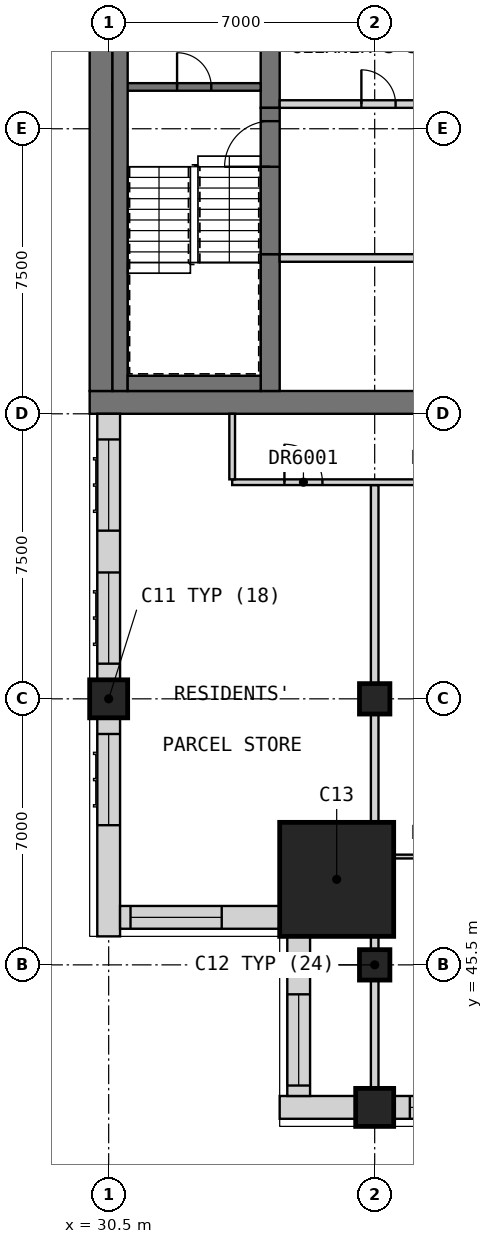
"""IFC4 building model, lengths in metres.
Left out: names, types, materials, properties, quantities, classifications, styles, units other than length and angle.
Written with IfcOpenShell. Run it as: python <this file> out.ifc"""

import sys

from ifc_helpers import new_model, si_unit, direction, frame, frame_2d, origin, origin_2d, place, context, subcontext, project, spatial, rectangle, extrude, element, fill, save


model = new_model("IFC4")
c1 = context("Model", 3, precision=1e-05, world=origin(), true_north=direction((0.0, 1.0)))
c2 = subcontext(c1, "Body", "Model", "MODEL_VIEW")
j1 = project(units=[si_unit("LENGTHUNIT", "METRE"), si_unit("PLANEANGLEUNIT", "RADIAN")], contexts=[c1])
p1 = place(None, origin())
s1 = spatial("IfcSite", under=j1, at=p1, CompositionType="ELEMENT")
p2 = place(p1, origin())
s2 = spatial("IfcBuilding", under=s1, at=p2, CompositionType="ELEMENT")
p3 = place(p2, frame((0.0, 0.0, 254.7)))
s3 = spatial("IfcBuildingStorey", under=s2, at=p3, CompositionType="ELEMENT", Elevation=254.7)
for number, where, z_axis, x_axis in (
    (1, (37.5, 41.75, 0.0), (0.0, 0.0, 1.0), (1.0, 0.0, 0.0)),
    (2, (30.5, 52.5, 0.0), (0.0, 0.0, 1.0), (1.0, 0.0, 0.0)),
):
    element("IfcColumn", number, at=place(p3, frame(where, z_axis=z_axis, x_axis=x_axis)), inside=s3, PredefinedType="COLUMN", context=c2, shape_type="SweptSolid", body=[
        extrude(rectangle(XDim=1.0, YDim=1.0, at=origin_2d()), origin(), (0.0, 0.0, 1.0), 3.5),
    ])
for number, where, z_axis, x_axis in (
    (3, (37.5, 45.5, 0.0), (0.0, 0.0, 1.0), (1.0, 0.0, 0.0)),
    (4, (37.5, 52.5, 0.0), (0.0, 0.0, 1.0), (1.0, 0.0, 0.0)),
):
    element("IfcColumn", number, at=place(p3, frame(where, z_axis=z_axis, x_axis=x_axis)), inside=s3, PredefinedType="COLUMN", context=c2, shape_type="SweptSolid", body=[
        extrude(rectangle(XDim=0.8, YDim=0.8, at=origin_2d()), origin(), (0.0, 0.0, 1.0), 3.5),
    ])
p4 = place(p3, frame((36.5, 47.75, 0.0), z_axis=(0.0, 0.0, 1.0), x_axis=(1.0, 0.0, 0.0)))
e5 = element("IfcColumn", 5, at=p4, inside=s3, PredefinedType="COLUMN", context=c2, shape_type="SweptSolid", body=[
    extrude(rectangle(XDim=3.0, YDim=3.0, at=origin_2d()), origin(), (0.0, 0.0, 1.0), 3.5),
])
p5 = place(p3, frame((30.0, 60.3, 0.0), z_axis=(0.0, 0.0, 1.0), x_axis=(1.0, 0.0, 0.0)))
e6 = element("IfcWall", 6, at=p5, inside=s3, PredefinedType="SHEAR", context=c2, shape_type="SweptSolid", body=[
    extrude(rectangle(XDim=30.0, YDim=0.6, at=frame_2d((15.0, 0.0))), origin(), (0.0, 0.0, 1.0), 3.5),
])
p6 = place(p5, frame((21.9, 0.0, 0.0)))
e7 = element("IfcOpeningElement", 7, at=p6, cuts=e6, PredefinedType="OPENING", context=c2, shape_type="SweptSolid", body=[
    extrude(rectangle(XDim=1.8, YDim=2.1, at=frame_2d((0.9, 1.05))), frame((0.0, 0.31, 0.0), z_axis=(0.0, -1.0, 0.0), x_axis=(1.0, 0.0, 0.0)), (0.0, 0.0, 1.0), 0.62),
])
p7 = place(p5, frame((26.5, 0.0, 0.0)))
e8 = element("IfcOpeningElement", 8, at=p7, cuts=e6, PredefinedType="OPENING", context=c2, shape_type="SweptSolid", body=[
    extrude(rectangle(XDim=1.2, YDim=2.1, at=frame_2d((0.6, 1.05))), frame((0.0, 0.31, 0.0), z_axis=(0.0, -1.0, 0.0), x_axis=(1.0, 0.0, 0.0)), (0.0, 0.0, 1.0), 0.62),
])
p8 = place(p3, frame((30.3, 60.6, 0.0), z_axis=(0.0, 0.0, 1.0), x_axis=(0.0, 1.0, 0.0)))
e9 = element("IfcWall", 9, at=p8, inside=s3, PredefinedType="SHEAR", context=c2, shape_type="SweptSolid", body=[
    extrude(rectangle(XDim=21.3, YDim=0.6, at=frame_2d((10.65, 0.0))), origin(), (0.0, 0.0, 1.0), 3.5),
])
p9 = place(p3, frame((34.75, 60.6, 0.0), z_axis=(0.0, 0.0, 1.0), x_axis=(0.0, 1.0, 0.0)))
e10 = element("IfcWall", 10, at=p9, inside=s3, PredefinedType="SHEAR", context=c2, shape_type="SweptSolid", body=[
    extrude(rectangle(XDim=3.6, YDim=0.5, at=frame_2d((1.8, 0.0))), origin(), (0.0, 0.0, 1.0), 3.5),
])
p10 = place(p3, frame((34.75, 68.05, 0.0), z_axis=(0.0, 0.0, 1.0), x_axis=(0.0, 1.0, 0.0)))
e11 = element("IfcWall", 11, at=p10, inside=s3, PredefinedType="SHEAR", context=c2, shape_type="SweptSolid", body=[
    extrude(rectangle(XDim=6.4, YDim=0.5, at=frame_2d((3.2, 0.0))), origin(), (0.0, 0.0, 1.0), 3.5),
])
p11 = place(p2, frame((0.0, 0.0, 34.0)))
s4 = spatial("IfcBuildingStorey", under=s2, at=p11, CompositionType="ELEMENT", Elevation=34.0)
for number, where, z_axis, x_axis in (
    (12, (29.7, 61.05, 0.0), (0.0, 0.0, 1.0), (0.0, 1.0, 0.0)),
    (13, (29.7, 65.925, 0.0), (0.0, 0.0, 1.0), (0.0, 1.0, 0.0)),
):
    element("IfcWall", number, at=place(p11, frame(where, z_axis=z_axis, x_axis=x_axis)), inside=s4, PredefinedType="SOLIDWALL", context=c2, shape_type="SweptSolid", body=[
        extrude(rectangle(XDim=0.9, YDim=0.6, at=frame_2d((0.45, 0.0))), origin(), (0.0, 0.0, 1.0), 286.2),
    ])
p12 = place(p3, frame((35.0, 41.75, 0.0), z_axis=(0.0, 0.0, 1.0), x_axis=(1.0, 0.0, 0.0)))
e14 = element("IfcWall", 14, at=p12, inside=s3, PredefinedType="SOLIDWALL", context=c2, shape_type="SweptSolid", body=[
    extrude(rectangle(XDim=2.0, YDim=0.6, at=frame_2d((1.0, 0.0))), origin(), (0.0, 0.0, 1.0), 3.1),
])
p13 = place(p3, frame((38.0, 41.75, 0.0), z_axis=(0.0, 0.0, 1.0), x_axis=(1.0, 0.0, 0.0)))
e15 = element("IfcWall", 15, at=p13, inside=s3, PredefinedType="SOLIDWALL", context=c2, shape_type="SweptSolid", body=[
    extrude(rectangle(XDim=6.5, YDim=0.6, at=frame_2d((3.25, 0.0))), origin(), (0.0, 0.0, 1.0), 2.75),
])
p14 = place(p13, frame((0.425, 0.0, 0.8)))
e16 = element("IfcOpeningElement", 16, at=p14, cuts=e15, PredefinedType="OPENING", context=c2, shape_type="SweptSolid", body=[
    extrude(rectangle(XDim=2.4, YDim=1.8, at=frame_2d((1.2, 0.9))), frame((0.0, 0.31, 0.0), z_axis=(0.0, -1.0, 0.0), x_axis=(1.0, 0.0, 0.0)), (0.0, 0.0, 1.0), 0.62),
])
p15 = place(p13, frame((3.675, 0.0, 0.8)))
e17 = element("IfcOpeningElement", 17, at=p15, cuts=e15, PredefinedType="OPENING", context=c2, shape_type="SweptSolid", body=[
    extrude(rectangle(XDim=2.4, YDim=1.8, at=frame_2d((1.2, 0.9))), frame((0.0, 0.31, 0.0), z_axis=(0.0, -1.0, 0.0), x_axis=(1.0, 0.0, 0.0)), (0.0, 0.0, 1.0), 0.62),
])
p16 = place(p3, frame((30.5, 60.0, 0.0), z_axis=(0.0, 0.0, 1.0), x_axis=(0.0, -1.0, 0.0)))
e18 = element("IfcWall", 18, at=p16, inside=s3, PredefinedType="SOLIDWALL", context=c2, shape_type="SweptSolid", body=[
    extrude(rectangle(XDim=7.0, YDim=0.6, at=frame_2d((3.5, 0.0))), origin(), (0.0, 0.0, 1.0), 3.1),
])
p17 = place(p16, frame((4.175, 0.0, 0.8)))
e19 = element("IfcOpeningElement", 19, at=p17, cuts=e18, PredefinedType="OPENING", context=c2, shape_type="SweptSolid", body=[
    extrude(rectangle(XDim=2.4, YDim=1.8, at=frame_2d((1.2, 0.9))), frame((0.0, 0.31, 0.0), z_axis=(0.0, -1.0, 0.0), x_axis=(1.0, 0.0, 0.0)), (0.0, 0.0, 1.0), 0.62),
])
p18 = place(p16, frame((0.675, 0.0, 0.8)))
e20 = element("IfcOpeningElement", 20, at=p18, cuts=e18, PredefinedType="OPENING", context=c2, shape_type="SweptSolid", body=[
    extrude(rectangle(XDim=2.4, YDim=1.8, at=frame_2d((1.2, 0.9))), frame((0.0, 0.31, 0.0), z_axis=(0.0, -1.0, 0.0), x_axis=(1.0, 0.0, 0.0)), (0.0, 0.0, 1.0), 0.62),
])
p19 = place(p3, frame((30.5, 52.0, 0.0), z_axis=(0.0, 0.0, 1.0), x_axis=(0.0, -1.0, 0.0)))
e21 = element("IfcWall", 21, at=p19, inside=s3, PredefinedType="SOLIDWALL", context=c2, shape_type="SweptSolid", body=[
    extrude(rectangle(XDim=5.75, YDim=0.6, at=frame_2d((2.875, 0.0))), origin(), (0.0, 0.0, 1.0), 3.1),
])
p20 = place(p19, frame((0.425, 0.0, 0.8)))
e22 = element("IfcOpeningElement", 22, at=p20, cuts=e21, PredefinedType="OPENING", context=c2, shape_type="SweptSolid", body=[
    extrude(rectangle(XDim=2.4, YDim=1.8, at=frame_2d((1.2, 0.9))), frame((0.0, 0.31, 0.0), z_axis=(0.0, -1.0, 0.0), x_axis=(1.0, 0.0, 0.0)), (0.0, 0.0, 1.0), 0.62),
])
p21 = place(p3, frame((30.8, 46.75, 0.0), z_axis=(0.0, 0.0, 1.0), x_axis=(1.0, 0.0, 0.0)))
e23 = element("IfcWall", 23, at=p21, inside=s3, PredefinedType="SOLIDWALL", context=c2, shape_type="SweptSolid", body=[
    extrude(rectangle(XDim=4.2, YDim=0.6, at=frame_2d((2.1, 0.0))), origin(), (0.0, 0.0, 1.0), 3.1),
])
p22 = place(p21, frame((0.275, 0.0, 0.8)))
e24 = element("IfcOpeningElement", 24, at=p22, cuts=e23, PredefinedType="OPENING", context=c2, shape_type="SweptSolid", body=[
    extrude(rectangle(XDim=2.4, YDim=1.8, at=frame_2d((1.2, 0.9))), frame((0.0, 0.31, 0.0), z_axis=(0.0, -1.0, 0.0), x_axis=(1.0, 0.0, 0.0)), (0.0, 0.0, 1.0), 0.62),
])
p23 = place(p3, frame((35.5, 46.25, 0.0), z_axis=(0.0, 0.0, 1.0), x_axis=(0.0, -1.0, 0.0)))
e25 = element("IfcWall", 25, at=p23, inside=s3, PredefinedType="SOLIDWALL", context=c2, shape_type="SweptSolid", body=[
    extrude(rectangle(XDim=4.2, YDim=0.6, at=frame_2d((2.1, 0.0))), origin(), (0.0, 0.0, 1.0), 3.1),
])
p24 = place(p23, frame((1.525, 0.0, 0.8)))
e26 = element("IfcOpeningElement", 26, at=p24, cuts=e25, PredefinedType="OPENING", context=c2, shape_type="SweptSolid", body=[
    extrude(rectangle(XDim=2.4, YDim=1.8, at=frame_2d((1.2, 0.9))), frame((0.0, 0.31, 0.0), z_axis=(0.0, -1.0, 0.0), x_axis=(1.0, 0.0, 0.0)), (0.0, 0.0, 1.0), 0.62),
])
p25 = place(p3, frame((35.0, 64.1, 0.0), z_axis=(0.0, 0.0, 1.0), x_axis=(1.0, 0.0, 0.0)))
e27 = element("IfcWall", 27, at=p25, inside=s3, PredefinedType="PARTITIONING", context=c2, shape_type="SweptSolid", body=[
    extrude(rectangle(XDim=15.6, YDim=0.2, at=frame_2d((7.8, 0.0))), origin(), (0.0, 0.0, 1.0), 3.09),
])
p26 = place(p25, frame((7.35, 0.0, 0.0)))
e28 = element("IfcOpeningElement", 28, at=p26, cuts=e27, PredefinedType="OPENING", context=c2, shape_type="SweptSolid", body=[
    extrude(rectangle(XDim=0.9, YDim=2.1, at=frame_2d((0.45, 1.05))), frame((0.0, 0.11, 0.0), z_axis=(0.0, -1.0, 0.0), x_axis=(1.0, 0.0, 0.0)), (0.0, 0.0, 1.0), 0.22),
])
p27 = place(p3, frame((35.0, 68.15, 0.0), z_axis=(0.0, 0.0, 1.0), x_axis=(1.0, 0.0, 0.0)))
e29 = element("IfcWall", 29, at=p27, inside=s3, PredefinedType="PARTITIONING", context=c2, shape_type="SweptSolid", body=[
    extrude(rectangle(XDim=15.6, YDim=0.2, at=frame_2d((7.8, 0.0))), origin(), (0.0, 0.0, 1.0), 3.09),
])
p28 = place(p27, frame((2.15, 0.0, 0.0)))
e30 = element("IfcOpeningElement", 30, at=p28, cuts=e29, PredefinedType="OPENING", context=c2, shape_type="SweptSolid", body=[
    extrude(rectangle(XDim=0.9, YDim=2.1, at=frame_2d((0.45, 1.05))), frame((0.0, 0.11, 0.0), z_axis=(0.0, -1.0, 0.0), x_axis=(1.0, 0.0, 0.0)), (0.0, 0.0, 1.0), 0.22),
])
p29 = place(p27, frame((7.35, 0.0, 0.0)))
e31 = element("IfcOpeningElement", 31, at=p29, cuts=e29, PredefinedType="OPENING", context=c2, shape_type="SweptSolid", body=[
    extrude(rectangle(XDim=0.9, YDim=2.1, at=frame_2d((0.45, 1.05))), frame((0.0, 0.11, 0.0), z_axis=(0.0, -1.0, 0.0), x_axis=(1.0, 0.0, 0.0)), (0.0, 0.0, 1.0), 0.22),
])
p30 = place(p27, frame((12.55, 0.0, 0.0)))
e32 = element("IfcOpeningElement", 32, at=p30, cuts=e29, PredefinedType="OPENING", context=c2, shape_type="SweptSolid", body=[
    extrude(rectangle(XDim=0.9, YDim=2.1, at=frame_2d((0.45, 1.05))), frame((0.0, 0.11, 0.0), z_axis=(0.0, -1.0, 0.0), x_axis=(1.0, 0.0, 0.0)), (0.0, 0.0, 1.0), 0.22),
])
p31 = place(p3, frame((34.75, 64.2, 0.0), z_axis=(0.0, 0.0, 1.0), x_axis=(0.0, 1.0, 0.0)))
e33 = element("IfcWall", 33, at=p31, inside=s3, PredefinedType="SOLIDWALL", context=c2, shape_type="SweptSolid", body=[
    extrude(rectangle(XDim=3.85, YDim=0.5, at=frame_2d((1.925, 0.0))), origin(), (0.0, 0.0, 1.0), 2.3),
])
p32 = place(p31, frame((2.3, 0.0, 0.0)))
e34 = element("IfcOpeningElement", 34, at=p32, cuts=e33, PredefinedType="OPENING", context=c2, shape_type="SweptSolid", body=[
    extrude(rectangle(XDim=1.2, YDim=2.1, at=frame_2d((0.6, 1.05))), frame((0.0, 0.26, 0.0), z_axis=(0.0, -1.0, 0.0), x_axis=(1.0, 0.0, 0.0)), (0.0, 0.0, 1.0), 0.52),
])
p33 = place(p3, frame((30.6, 68.6, 0.0), z_axis=(0.0, 0.0, 1.0), x_axis=(1.0, 0.0, 0.0)))
e35 = element("IfcWall", 35, at=p33, inside=s3, PredefinedType="SOLIDWALL", context=c2, shape_type="SweptSolid", body=[
    extrude(rectangle(XDim=3.9, YDim=0.2, at=frame_2d((1.95, 0.0))), origin(), (0.0, 0.0, 1.0), 3.09),
])
p34 = place(p33, frame((1.7, 0.0, 0.0)))
e36 = element("IfcOpeningElement", 36, at=p34, cuts=e35, PredefinedType="OPENING", context=c2, shape_type="SweptSolid", body=[
    extrude(rectangle(XDim=0.9, YDim=2.1, at=frame_2d((0.45, 1.05))), frame((0.0, 0.11, 0.0), z_axis=(0.0, -1.0, 0.0), x_axis=(1.0, 0.0, 0.0)), (0.0, 0.0, 1.0), 0.22),
])
p35 = place(p3, frame((30.8, 60.6, 0.0), z_axis=(0.0, 0.0, 1.0), x_axis=(0.0, 1.0, 0.0)))
e37 = element("IfcWall", 37, at=p35, inside=s3, PredefinedType="SOLIDWALL", context=c2, shape_type="SweptSolid", body=[
    extrude(rectangle(XDim=21.3, YDim=0.4, at=frame_2d((10.65, 0.0))), origin(), (0.0, 0.0, 1.0), 3.09),
])
p36 = place(p3, frame((31.0, 60.8, 0.0), z_axis=(0.0, 0.0, 1.0), x_axis=(1.0, 0.0, 0.0)))
e38 = element("IfcWall", 38, at=p36, inside=s3, PredefinedType="SOLIDWALL", context=c2, shape_type="SweptSolid", body=[
    extrude(rectangle(XDim=3.5, YDim=0.4, at=frame_2d((1.75, 0.0))), origin(), (0.0, 0.0, 1.0), 3.09),
])
p37 = place(p3, frame((37.5, 41.25, 0.0), z_axis=(0.0, 0.0, 1.0), x_axis=(0.0, 1.0, 0.0)))
e39 = element("IfcWall", 39, at=p37, inside=s3, PredefinedType="PARTITIONING", context=c2, shape_type="SweptSolid", body=[
    extrude(rectangle(XDim=16.875, YDim=0.2, at=frame_2d((8.438, 0.0))), origin(), (0.0, 0.0, 1.0), 2.75),
])
p38 = place(p3, frame((33.75, 58.2, 0.0), z_axis=(0.0, 0.0, 1.0), x_axis=(1.0, 0.0, 0.0)))
e40 = element("IfcWall", 40, at=p38, inside=s3, PredefinedType="PARTITIONING", context=c2, shape_type="SweptSolid", body=[
    extrude(rectangle(XDim=28.05, YDim=0.15, at=frame_2d((14.025, 0.0))), origin(), (0.0, 0.0, 1.0), 3.1),
])
p39 = place(p38, frame((1.375, 0.0, 0.0)))
e41 = element("IfcOpeningElement", 41, at=p39, cuts=e40, PredefinedType="OPENING", context=c2, shape_type="SweptSolid", body=[
    extrude(rectangle(XDim=1.0, YDim=2.1, at=frame_2d((0.5, 1.05))), frame((0.0, 0.085, 0.0), z_axis=(0.0, -1.0, 0.0), x_axis=(1.0, 0.0, 0.0)), (0.0, 0.0, 1.0), 0.17),
])
p40 = place(p38, frame((5.175, 0.0, 0.0)))
e42 = element("IfcOpeningElement", 42, at=p40, cuts=e40, PredefinedType="OPENING", context=c2, shape_type="SweptSolid", body=[
    extrude(rectangle(XDim=0.9, YDim=2.1, at=frame_2d((0.45, 1.05))), frame((0.0, 0.085, 0.0), z_axis=(0.0, -1.0, 0.0), x_axis=(1.0, 0.0, 0.0)), (0.0, 0.0, 1.0), 0.17),
])
p41 = place(p38, frame((12.675, 0.0, 0.0)))
e43 = element("IfcOpeningElement", 43, at=p41, cuts=e40, PredefinedType="OPENING", context=c2, shape_type="SweptSolid", body=[
    extrude(rectangle(XDim=0.9, YDim=2.1, at=frame_2d((0.45, 1.05))), frame((0.0, 0.085, 0.0), z_axis=(0.0, -1.0, 0.0), x_axis=(1.0, 0.0, 0.0)), (0.0, 0.0, 1.0), 0.17),
])
p42 = place(p38, frame((20.175, 0.0, 0.0)))
e44 = element("IfcOpeningElement", 44, at=p42, cuts=e40, PredefinedType="OPENING", context=c2, shape_type="SweptSolid", body=[
    extrude(rectangle(XDim=0.9, YDim=2.1, at=frame_2d((0.45, 1.05))), frame((0.0, 0.085, 0.0), z_axis=(0.0, -1.0, 0.0), x_axis=(1.0, 0.0, 0.0)), (0.0, 0.0, 1.0), 0.17),
])
p43 = place(p38, frame((26.7, 0.0, 0.0)))
e45 = element("IfcOpeningElement", 45, at=p43, cuts=e40, PredefinedType="OPENING", context=c2, shape_type="SweptSolid", body=[
    extrude(rectangle(XDim=0.9, YDim=2.1, at=frame_2d((0.45, 1.05))), frame((0.0, 0.085, 0.0), z_axis=(0.0, -1.0, 0.0), x_axis=(1.0, 0.0, 0.0)), (0.0, 0.0, 1.0), 0.17),
])
p44 = place(p3, frame((33.75, 58.275, 0.0), z_axis=(0.0, 0.0, 1.0), x_axis=(0.0, 1.0, 0.0)))
e46 = element("IfcWall", 46, at=p44, inside=s3, PredefinedType="PARTITIONING", context=c2, shape_type="SweptSolid", body=[
    extrude(rectangle(XDim=1.725, YDim=0.15, at=frame_2d((0.863, 0.0))), origin(), (0.0, 0.0, 1.0), 3.1),
])
p45 = place(p3, frame((37.6, 48.35, 0.0), z_axis=(0.0, 0.0, 1.0), x_axis=(1.0, 0.0, 0.0)))
e47 = element("IfcWall", 47, at=p45, inside=s3, PredefinedType="PARTITIONING", context=c2, shape_type="SweptSolid", body=[
    extrude(rectangle(XDim=22.3, YDim=0.1, at=frame_2d((11.15, 0.0))), origin(), (0.0, 0.0, 1.0), 3.1),
])
p46 = place(p45, frame((1.325, 0.0, 0.0)))
e48 = element("IfcOpeningElement", 48, at=p46, cuts=e47, PredefinedType="OPENING", context=c2, shape_type="SweptSolid", body=[
    extrude(rectangle(XDim=0.9, YDim=2.1, at=frame_2d((0.45, 1.05))), frame((0.0, 0.06, 0.0), z_axis=(0.0, -1.0, 0.0), x_axis=(1.0, 0.0, 0.0)), (0.0, 0.0, 1.0), 0.12),
])
p47 = place(p45, frame((8.825, 0.0, 0.0)))
e49 = element("IfcOpeningElement", 49, at=p47, cuts=e47, PredefinedType="OPENING", context=c2, shape_type="SweptSolid", body=[
    extrude(rectangle(XDim=0.9, YDim=2.1, at=frame_2d((0.45, 1.05))), frame((0.0, 0.06, 0.0), z_axis=(0.0, -1.0, 0.0), x_axis=(1.0, 0.0, 0.0)), (0.0, 0.0, 1.0), 0.12),
])
p48 = place(p45, frame((16.325, 0.0, 0.0)))
e50 = element("IfcOpeningElement", 50, at=p48, cuts=e47, PredefinedType="OPENING", context=c2, shape_type="SweptSolid", body=[
    extrude(rectangle(XDim=0.9, YDim=2.1, at=frame_2d((0.45, 1.05))), frame((0.0, 0.06, 0.0), z_axis=(0.0, -1.0, 0.0), x_axis=(1.0, 0.0, 0.0)), (0.0, 0.0, 1.0), 0.12),
])
p49 = place(p14, origin())
e51 = element("IfcWindow", 51, at=p49, inside=s3, PartitioningType="SINGLE_PANEL", PredefinedType="WINDOW", context=c2, shape_type="SweptSolid", body=[
    extrude(rectangle(XDim=2.4, YDim=1.8, at=frame_2d((1.2, 0.9))), frame((0.0, -0.07, 0.0), z_axis=(0.0, -1.0, 0.0), x_axis=(1.0, 0.0, 0.0)), (0.0, 0.0, 1.0), 0.06),
])
fill(e16, e51)
p50 = place(p17, origin())
e52 = element("IfcWindow", 52, at=p50, inside=s3, PartitioningType="SINGLE_PANEL", PredefinedType="WINDOW", context=c2, shape_type="SweptSolid", body=[
    extrude(rectangle(XDim=2.4, YDim=1.8, at=frame_2d((1.2, 0.9))), frame((0.0, -0.07, 0.0), z_axis=(0.0, -1.0, 0.0), x_axis=(1.0, 0.0, 0.0)), (0.0, 0.0, 1.0), 0.06),
])
fill(e19, e52)
p51 = place(p18, origin())
e53 = element("IfcWindow", 53, at=p51, inside=s3, PartitioningType="SINGLE_PANEL", PredefinedType="WINDOW", context=c2, shape_type="SweptSolid", body=[
    extrude(rectangle(XDim=2.4, YDim=1.8, at=frame_2d((1.2, 0.9))), frame((0.0, -0.07, 0.0), z_axis=(0.0, -1.0, 0.0), x_axis=(1.0, 0.0, 0.0)), (0.0, 0.0, 1.0), 0.06),
])
fill(e20, e53)
p52 = place(p20, origin())
e54 = element("IfcWindow", 54, at=p52, inside=s3, PartitioningType="SINGLE_PANEL", PredefinedType="WINDOW", context=c2, shape_type="SweptSolid", body=[
    extrude(rectangle(XDim=2.4, YDim=1.8, at=frame_2d((1.2, 0.9))), frame((0.0, -0.07, 0.0), z_axis=(0.0, -1.0, 0.0), x_axis=(1.0, 0.0, 0.0)), (0.0, 0.0, 1.0), 0.06),
])
fill(e22, e54)
p53 = place(p22, origin())
e55 = element("IfcWindow", 55, at=p53, inside=s3, PartitioningType="SINGLE_PANEL", PredefinedType="WINDOW", context=c2, shape_type="SweptSolid", body=[
    extrude(rectangle(XDim=2.4, YDim=1.8, at=frame_2d((1.2, 0.9))), frame((0.0, -0.07, 0.0), z_axis=(0.0, -1.0, 0.0), x_axis=(1.0, 0.0, 0.0)), (0.0, 0.0, 1.0), 0.06),
])
fill(e24, e55)
p54 = place(p24, origin())
e56 = element("IfcWindow", 56, at=p54, inside=s3, PartitioningType="SINGLE_PANEL", PredefinedType="WINDOW", context=c2, shape_type="SweptSolid", body=[
    extrude(rectangle(XDim=2.4, YDim=1.8, at=frame_2d((1.2, 0.9))), frame((0.0, -0.07, 0.0), z_axis=(0.0, -1.0, 0.0), x_axis=(1.0, 0.0, 0.0)), (0.0, 0.0, 1.0), 0.06),
])
fill(e26, e56)
p55 = place(p28, origin())
e57 = element("IfcDoor", 57, at=p55, inside=s3, OperationType="SINGLE_SWING_RIGHT", PredefinedType="DOOR", context=c2, shape_type="SweptSolid", body=[
    extrude(rectangle(XDim=0.9, YDim=2.1, at=frame_2d((0.45, 1.05))), frame((0.0, 0.025, 0.0), z_axis=(0.0, -1.0, 0.0), x_axis=(1.0, 0.0, 0.0)), (0.0, 0.0, 1.0), 0.05),
])
fill(e30, e57)
p56 = place(p32, origin())
e58 = element("IfcDoor", 58, at=p56, inside=s3, OperationType="SINGLE_SWING_LEFT", PredefinedType="DOOR", context=c2, shape_type="SweptSolid", body=[
    extrude(rectangle(XDim=1.2, YDim=2.1, at=frame_2d((0.6, 1.05))), frame((0.0, 0.025, 0.0), z_axis=(0.0, -1.0, 0.0), x_axis=(1.0, 0.0, 0.0)), (0.0, 0.0, 1.0), 0.05),
])
fill(e34, e58)
p57 = place(p34, origin())
e59 = element("IfcDoor", 59, at=p57, inside=s3, OperationType="SINGLE_SWING_LEFT", PredefinedType="DOOR", context=c2, shape_type="SweptSolid", body=[
    extrude(rectangle(XDim=0.9, YDim=2.1, at=frame_2d((0.45, 1.05))), frame((0.0, 0.025, 0.0), z_axis=(0.0, -1.0, 0.0), x_axis=(1.0, 0.0, 0.0)), (0.0, 0.0, 1.0), 0.05),
])
fill(e36, e59)
p58 = place(p39, origin())
e60 = element("IfcDoor", 60, at=p58, inside=s3, OperationType="SINGLE_SWING_RIGHT", PredefinedType="DOOR", context=c2, shape_type="SweptSolid", body=[
    extrude(rectangle(XDim=1.0, YDim=2.1, at=frame_2d((0.5, 1.05))), frame((0.0, 0.025, 0.0), z_axis=(0.0, -1.0, 0.0), x_axis=(1.0, 0.0, 0.0)), (0.0, 0.0, 1.0), 0.05),
])
fill(e41, e60)
save(model, sys.argv[1])
